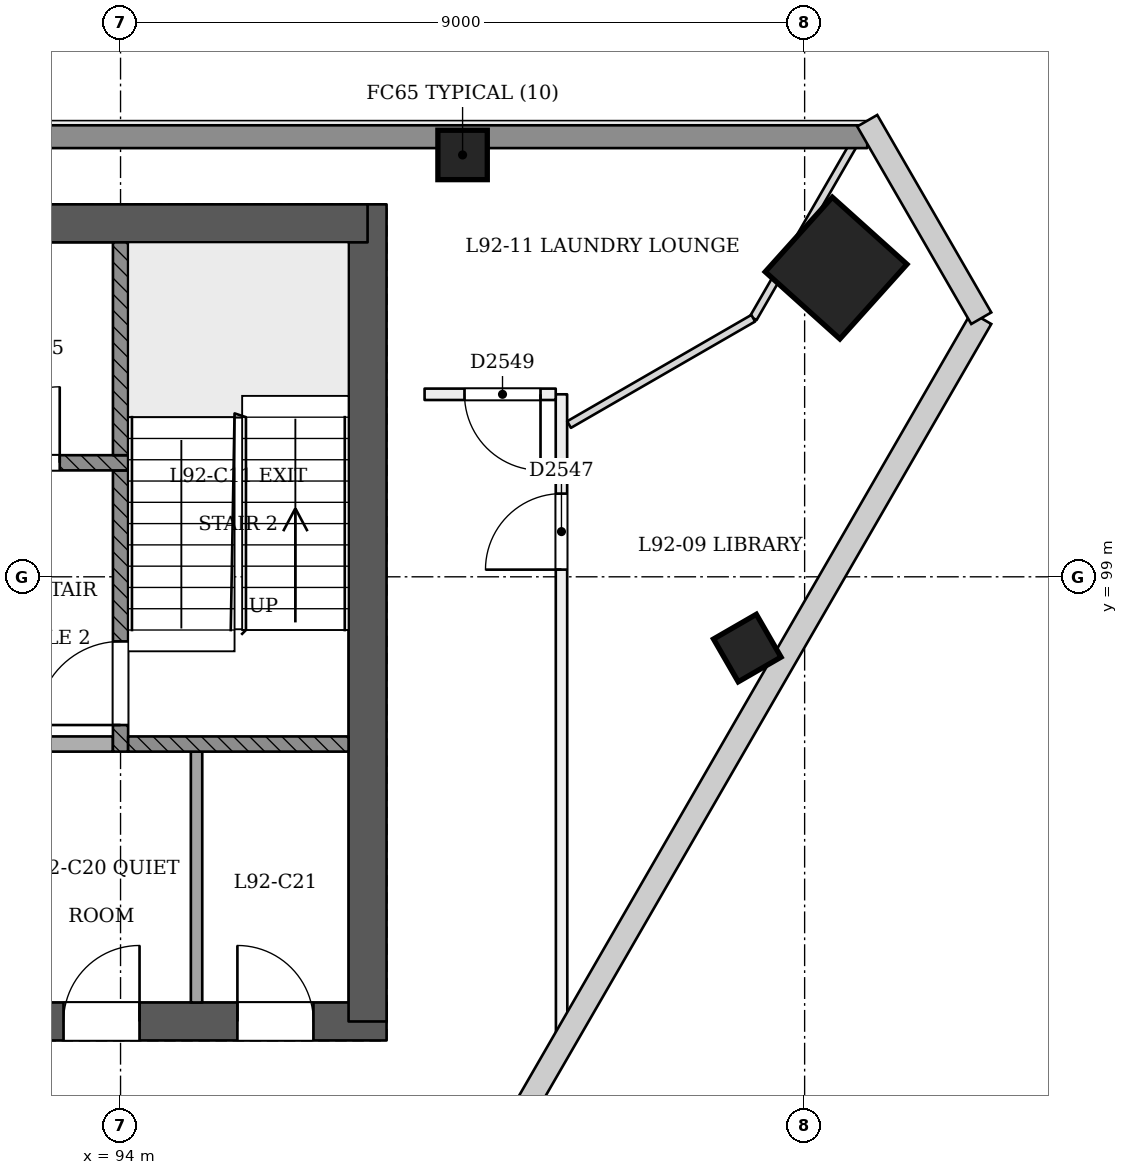
"""IFC4 building model, lengths in metres.
Left out: names, types, materials, properties, quantities, classifications, styles, units other than length and angle.
Written with IfcOpenShell. Run it as: python <this file> out.ifc"""

import sys

from ifc_helpers import new_model, si_unit, direction, frame, frame_2d, origin, origin_2d, place, context, subcontext, project, spatial, rectangle, extrude, element, fill, save


model = new_model("IFC4")
c1 = context("Model", 3, precision=1e-05, world=origin(), true_north=direction((0.0, 1.0)))
c2 = subcontext(c1, "Body", "Model", "MODEL_VIEW")
j1 = project(units=[si_unit("LENGTHUNIT", "METRE"), si_unit("PLANEANGLEUNIT", "RADIAN")], contexts=[c1])
p1 = place(None, origin())
s1 = spatial("IfcSite", under=j1, at=p1, CompositionType="ELEMENT")
p2 = place(p1, origin())
s2 = spatial("IfcBuilding", under=s1, at=p2, CompositionType="ELEMENT")
p3 = place(p2, frame((0.0, 0.0, 354.4)))
s3 = spatial("IfcBuildingStorey", under=s2, at=p3, CompositionType="ELEMENT", Elevation=354.4)
p4 = place(p3, frame((72.75, 93.15, 0.0), z_axis=(0.0, 0.0, 1.0), x_axis=(1.0, 0.0, 0.0)))
e1 = element("IfcWall", 1, at=p4, inside=s3, PredefinedType="SHEAR", context=c2, shape_type="SweptSolid", body=[
    extrude(rectangle(XDim=24.75, YDim=0.5, at=frame_2d((12.375, 0.0))), origin(), (0.0, 0.0, 1.0), 3.6),
])
p5 = place(p4, frame((1.05, 0.0, 0.0)))
e2 = element("IfcOpeningElement", 2, at=p5, cuts=e1, PredefinedType="OPENING", context=c2, shape_type="SweptSolid", body=[
    extrude(rectangle(XDim=1.2, YDim=2.1, at=frame_2d((0.6, 1.05))), frame((0.0, 0.26, 0.0), z_axis=(0.0, -1.0, 0.0), x_axis=(1.0, 0.0, 0.0)), (0.0, 0.0, 1.0), 0.521),
])
p6 = place(p4, frame((3.25, 0.0, 0.0)))
e3 = element("IfcOpeningElement", 3, at=p6, cuts=e1, PredefinedType="OPENING", context=c2, shape_type="SweptSolid", body=[
    extrude(rectangle(XDim=1.2, YDim=2.1, at=frame_2d((0.6, 1.05))), frame((0.0, 0.26, 0.0), z_axis=(0.0, -1.0, 0.0), x_axis=(1.0, 0.0, 0.0)), (0.0, 0.0, 1.0), 0.521),
])
p7 = place(p4, frame((13.25, 0.0, 0.0)))
e4 = element("IfcOpeningElement", 4, at=p7, cuts=e1, PredefinedType="OPENING", context=c2, shape_type="SweptSolid", body=[
    extrude(rectangle(XDim=1.2, YDim=2.1, at=frame_2d((0.6, 1.05))), frame((0.0, 0.26, 0.0), z_axis=(0.0, -1.0, 0.0), x_axis=(1.0, 0.0, 0.0)), (0.0, 0.0, 1.0), 0.521),
])
p8 = place(p4, frame((15.712, 0.0, 0.0)))
e5 = element("IfcOpeningElement", 5, at=p8, cuts=e1, PredefinedType="OPENING", context=c2, shape_type="SweptSolid", body=[
    extrude(rectangle(XDim=1.0, YDim=2.1, at=frame_2d((0.5, 1.05))), frame((0.0, 0.26, 0.0), z_axis=(0.0, -1.0, 0.0), x_axis=(1.0, 0.0, 0.0)), (0.0, 0.0, 1.0), 0.521),
])
p9 = place(p4, frame((18.15, 0.0, 0.0)))
e6 = element("IfcOpeningElement", 6, at=p9, cuts=e1, PredefinedType="OPENING", context=c2, shape_type="SweptSolid", body=[
    extrude(rectangle(XDim=1.0, YDim=2.1, at=frame_2d((0.5, 1.05))), frame((0.0, 0.26, 0.0), z_axis=(0.0, -1.0, 0.0), x_axis=(1.0, 0.0, 0.0)), (0.0, 0.0, 1.0), 0.521),
])
p10 = place(p4, frame((20.5, 0.0, 0.0)))
e7 = element("IfcOpeningElement", 7, at=p10, cuts=e1, PredefinedType="OPENING", context=c2, shape_type="SweptSolid", body=[
    extrude(rectangle(XDim=1.0, YDim=2.1, at=frame_2d((0.5, 1.05))), frame((0.0, 0.26, 0.0), z_axis=(0.0, -1.0, 0.0), x_axis=(1.0, 0.0, 0.0)), (0.0, 0.0, 1.0), 0.521),
])
p11 = place(p4, frame((22.788, 0.0, 0.0)))
e8 = element("IfcOpeningElement", 8, at=p11, cuts=e1, PredefinedType="OPENING", context=c2, shape_type="SweptSolid", body=[
    extrude(rectangle(XDim=1.0, YDim=2.1, at=frame_2d((0.5, 1.05))), frame((0.0, 0.26, 0.0), z_axis=(0.0, -1.0, 0.0), x_axis=(1.0, 0.0, 0.0)), (0.0, 0.0, 1.0), 0.521),
])
p12 = place(p3, frame((97.25, 93.15, 0.0), z_axis=(0.0, 0.0, 1.0), x_axis=(0.0, 1.0, 0.0)))
e9 = element("IfcWall", 9, at=p12, inside=s3, PredefinedType="SHEAR", context=c2, shape_type="SweptSolid", body=[
    extrude(rectangle(XDim=10.75, YDim=0.5, at=frame_2d((5.375, 0.0))), origin(), (0.0, 0.0, 1.0), 3.6),
])
p13 = place(p3, frame((97.25, 103.65, 0.0), z_axis=(0.0, 0.0, 1.0), x_axis=(-1.0, 0.0, 0.0)))
e10 = element("IfcWall", 10, at=p13, inside=s3, PredefinedType="SHEAR", context=c2, shape_type="SweptSolid", body=[
    extrude(rectangle(XDim=24.75, YDim=0.5, at=frame_2d((12.375, 0.0))), origin(), (0.0, 0.0, 1.0), 3.6),
])
p14 = place(p3, frame((103.448, 103.051, 0.0), z_axis=(-0.028401814599, 0.009218727412, 0.999554076572), x_axis=(0.500752502832, -0.865305542785, 0.022209199275)))
e11 = element("IfcColumn", 11, at=p14, inside=s3, PredefinedType="COLUMN", context=c2, shape_type="SweptSolid", body=[
    extrude(rectangle(XDim=1.32, YDim=1.32, at=origin_2d()), origin(), (0.0, 0.0, 1.0), 3.602),
])
p15 = place(p3, frame((98.5, 104.55, 0.0), z_axis=(0.0, 0.0, 1.0), x_axis=(1.0, 0.0, 0.0)))
e12 = element("IfcColumn", 12, at=p15, inside=s3, PredefinedType="COLUMN", context=c2, shape_type="SweptSolid", body=[
    extrude(rectangle(XDim=0.65, YDim=0.65, at=origin_2d()), origin(), (0.0, 0.0, 1.0), 3.6),
])
p16 = place(p3, frame((102.273, 98.016, -0.02), z_axis=(-0.022222910879, 0.038415824599, 0.999014697916), x_axis=(-0.499512959151, -0.866022170157, 0.022190187852)))
e13 = element("IfcColumn", 13, at=p16, inside=s3, PredefinedType="COLUMN", context=c2, shape_type="SweptSolid", body=[
    extrude(rectangle(XDim=0.65, YDim=0.65, at=origin_2d()), origin(), (0.0, 0.0, 1.0), 3.604),
])
p17 = place(p3, frame((99.803, 92.968, 0.0), z_axis=(0.0, 0.0, 1.0), x_axis=(-0.000318443663, 0.999999949297, 0.0)))
e14 = element("IfcWall", 14, at=p17, inside=s3, PredefinedType="PARTITIONING", context=c2, shape_type="SweptSolid", body=[
    extrude(rectangle(XDim=8.433, YDim=0.15, at=frame_2d((4.217, 0.0))), origin(), (0.0, 0.0, 1.0), 3.3),
])
p18 = place(p17, frame((6.127, 0.0, 0.0)))
e15 = element("IfcOpeningElement", 15, at=p18, cuts=e14, PredefinedType="OPENING", context=c2, shape_type="SweptSolid", body=[
    extrude(rectangle(XDim=1.0, YDim=2.1, at=frame_2d((0.5, 1.05))), frame((0.0, 0.085, 0.0), z_axis=(0.0, -1.0, 0.0), x_axis=(1.0, 0.0, 0.0)), (0.0, 0.0, 1.0), 0.171),
])
p19 = place(p3, frame((99.725, 101.401, 0.0), z_axis=(0.0, 0.0, 1.0), x_axis=(-1.0, 0.0, 0.0)))
e16 = element("IfcWall", 16, at=p19, inside=s3, PredefinedType="PARTITIONING", context=c2, shape_type="SweptSolid", body=[
    extrude(rectangle(XDim=1.725, YDim=0.15, at=frame_2d((0.863, 0.0))), origin(), (0.0, 0.0, 1.0), 3.3),
])
p20 = place(p19, frame((0.2, 0.0, 0.0)))
e17 = element("IfcOpeningElement", 17, at=p20, cuts=e16, PredefinedType="OPENING", context=c2, shape_type="SweptSolid", body=[
    extrude(rectangle(XDim=1.0, YDim=2.1, at=frame_2d((0.5, 1.05))), frame((0.0, 0.085, 0.0), z_axis=(0.0, -1.0, 0.0), x_axis=(1.0, 0.0, 0.0)), (0.0, 0.0, 1.0), 0.171),
])
p21 = place(p3, frame((103.766, 104.9, 0.0), z_axis=(0.0, 0.0, 1.0), x_axis=(-0.500035042182, -0.866005171226, 0.0)))
e18 = element("IfcWall", 18, at=p21, inside=s3, PredefinedType="PARTITIONING", context=c2, shape_type="SweptSolid", body=[
    extrude(rectangle(XDim=2.885, YDim=0.1, at=frame_2d((1.442, 0.0))), origin(), (0.0, 0.0, 1.0), 3.3),
])
p22 = place(p3, frame((102.324, 102.402, 0.0), z_axis=(0.0, 0.0, 1.0), x_axis=(-0.866017045845, -0.500014476097, 0.0)))
e19 = element("IfcWall", 19, at=p22, inside=s3, PredefinedType="PARTITIONING", context=c2, shape_type="SweptSolid", body=[
    extrude(rectangle(XDim=2.798, YDim=0.1, at=frame_2d((1.399, 0.0))), origin(), (0.0, 0.0, 1.0), 3.3),
])
p23 = place(p3, frame((66.176, 104.79, 0.0), z_axis=(0.0, 0.0, 1.0), x_axis=(1.0, 0.0, 0.0)))
e20 = element("IfcWall", 20, at=p23, inside=s3, PredefinedType="SOLIDWALL", context=c2, shape_type="SweptSolid", body=[
    extrude(rectangle(XDim=37.647, YDim=0.3, at=frame_2d((18.824, 0.0))), origin(), (0.0, 0.0, 1.0), 3.3),
])
p24 = place(p3, frame((95.0, 93.4, 0.0), z_axis=(0.0, 0.0, 1.0), x_axis=(0.0, 1.0, 0.0)))
e21 = element("IfcWall", 21, at=p24, inside=s3, PredefinedType="PARTITIONING", context=c2, shape_type="SweptSolid", body=[
    extrude(rectangle(XDim=3.3, YDim=0.15, at=frame_2d((1.65, 0.0))), origin(), (0.0, 0.0, 1.0), 3.3),
])
p25 = place(p3, frame((91.5, 96.8, 0.0), z_axis=(0.0, 0.0, 1.0), x_axis=(1.0, 0.0, 0.0)))
e22 = element("IfcWall", 22, at=p25, inside=s3, PredefinedType="PARTITIONING", context=c2, shape_type="SweptSolid", body=[
    extrude(rectangle(XDim=2.4, YDim=0.2, at=frame_2d((1.2, 0.0))), origin(), (0.0, 0.0, 1.0), 3.3),
])
p26 = place(p3, frame((94.0, 96.7, 0.0), z_axis=(0.0, 0.0, 1.0), x_axis=(0.0, 1.0, 0.0)))
e23 = element("IfcWall", 23, at=p26, inside=s3, PredefinedType="SOLIDWALL", context=c2, shape_type="SweptSolid", body=[
    extrude(rectangle(XDim=3.7, YDim=0.2, at=frame_2d((1.85, 0.0))), origin(), (0.0, 0.0, 1.0), 3.3),
])
p27 = place(p26, frame((0.35, 0.0, 0.0)))
e24 = element("IfcOpeningElement", 24, at=p27, cuts=e23, PredefinedType="OPENING", context=c2, shape_type="SweptSolid", body=[
    extrude(rectangle(XDim=1.1, YDim=2.1, at=frame_2d((0.55, 1.05))), frame((0.0, 0.11, 0.0), z_axis=(0.0, -1.0, 0.0), x_axis=(1.0, 0.0, 0.0)), (0.0, 0.0, 1.0), 0.221),
])
p28 = place(p3, frame((94.1, 96.8, 0.0), z_axis=(0.0, 0.0, 1.0), x_axis=(1.0, 0.0, 0.0)))
e25 = element("IfcWall", 25, at=p28, inside=s3, PredefinedType="SOLIDWALL", context=c2, shape_type="SweptSolid", body=[
    extrude(rectangle(XDim=2.9, YDim=0.2, at=frame_2d((1.45, 0.0))), origin(), (0.0, 0.0, 1.0), 3.3),
])
p29 = place(p3, frame((75.9, 100.5, 0.0), z_axis=(0.0, 0.0, 1.0), x_axis=(1.0, 0.0, 0.0)))
e26 = element("IfcWall", 26, at=p29, inside=s3, PredefinedType="SOLIDWALL", context=c2, shape_type="SweptSolid", body=[
    extrude(rectangle(XDim=18.2, YDim=0.2, at=frame_2d((9.1, 0.0))), origin(), (0.0, 0.0, 1.0), 3.3),
])
p30 = place(p29, frame((2.6, 0.0, 0.0)))
e27 = element("IfcOpeningElement", 27, at=p30, cuts=e26, PredefinedType="OPENING", context=c2, shape_type="SweptSolid", body=[
    extrude(rectangle(XDim=1.1, YDim=2.1, at=frame_2d((0.55, 1.05))), frame((0.0, 0.11, 0.0), z_axis=(0.0, -1.0, 0.0), x_axis=(1.0, 0.0, 0.0)), (0.0, 0.0, 1.0), 0.221),
])
p31 = place(p29, frame((4.5, 0.0, 0.0)))
e28 = element("IfcOpeningElement", 28, at=p31, cuts=e26, PredefinedType="OPENING", context=c2, shape_type="SweptSolid", body=[
    extrude(rectangle(XDim=1.1, YDim=2.1, at=frame_2d((0.55, 1.05))), frame((0.0, 0.11, 0.0), z_axis=(0.0, -1.0, 0.0), x_axis=(1.0, 0.0, 0.0)), (0.0, 0.0, 1.0), 0.221),
])
p32 = place(p29, frame((6.4, 0.0, 0.0)))
e29 = element("IfcOpeningElement", 29, at=p32, cuts=e26, PredefinedType="OPENING", context=c2, shape_type="SweptSolid", body=[
    extrude(rectangle(XDim=1.1, YDim=2.1, at=frame_2d((0.55, 1.05))), frame((0.0, 0.11, 0.0), z_axis=(0.0, -1.0, 0.0), x_axis=(1.0, 0.0, 0.0)), (0.0, 0.0, 1.0), 0.221),
])
p33 = place(p29, frame((8.3, 0.0, 0.0)))
e30 = element("IfcOpeningElement", 30, at=p33, cuts=e26, PredefinedType="OPENING", context=c2, shape_type="SweptSolid", body=[
    extrude(rectangle(XDim=1.1, YDim=2.1, at=frame_2d((0.55, 1.05))), frame((0.0, 0.11, 0.0), z_axis=(0.0, -1.0, 0.0), x_axis=(1.0, 0.0, 0.0)), (0.0, 0.0, 1.0), 0.221),
])
p34 = place(p29, frame((10.2, 0.0, 0.0)))
e31 = element("IfcOpeningElement", 31, at=p34, cuts=e26, PredefinedType="OPENING", context=c2, shape_type="SweptSolid", body=[
    extrude(rectangle(XDim=1.1, YDim=2.1, at=frame_2d((0.55, 1.05))), frame((0.0, 0.11, 0.0), z_axis=(0.0, -1.0, 0.0), x_axis=(1.0, 0.0, 0.0)), (0.0, 0.0, 1.0), 0.221),
])
p35 = place(p29, frame((12.1, 0.0, 0.0)))
e32 = element("IfcOpeningElement", 32, at=p35, cuts=e26, PredefinedType="OPENING", context=c2, shape_type="SweptSolid", body=[
    extrude(rectangle(XDim=1.1, YDim=2.1, at=frame_2d((0.55, 1.05))), frame((0.0, 0.11, 0.0), z_axis=(0.0, -1.0, 0.0), x_axis=(1.0, 0.0, 0.0)), (0.0, 0.0, 1.0), 0.221),
])
p36 = place(p29, frame((14.0, 0.0, 0.0)))
e33 = element("IfcOpeningElement", 33, at=p36, cuts=e26, PredefinedType="OPENING", context=c2, shape_type="SweptSolid", body=[
    extrude(rectangle(XDim=1.1, YDim=2.1, at=frame_2d((0.55, 1.05))), frame((0.0, 0.11, 0.0), z_axis=(0.0, -1.0, 0.0), x_axis=(1.0, 0.0, 0.0)), (0.0, 0.0, 1.0), 0.221),
])
p37 = place(p29, frame((0.65, 0.0, 0.0)))
e34 = element("IfcOpeningElement", 34, at=p37, cuts=e26, PredefinedType="OPENING", context=c2, shape_type="SweptSolid", body=[
    extrude(rectangle(XDim=1.0, YDim=2.1, at=frame_2d((0.5, 1.05))), frame((0.0, 0.11, 0.0), z_axis=(0.0, -1.0, 0.0), x_axis=(1.0, 0.0, 0.0)), (0.0, 0.0, 1.0), 0.221),
])
p38 = place(p29, frame((16.3, 0.0, 0.0)))
e35 = element("IfcOpeningElement", 35, at=p38, cuts=e26, PredefinedType="OPENING", context=c2, shape_type="SweptSolid", body=[
    extrude(rectangle(XDim=1.0, YDim=2.1, at=frame_2d((0.5, 1.05))), frame((0.0, 0.11, 0.0), z_axis=(0.0, -1.0, 0.0), x_axis=(1.0, 0.0, 0.0)), (0.0, 0.0, 1.0), 0.221),
])
p39 = place(p3, frame((94.0, 100.6, 0.0), z_axis=(0.0, 0.0, 1.0), x_axis=(0.0, 1.0, 0.0)))
e36 = element("IfcWall", 36, at=p39, inside=s3, PredefinedType="SOLIDWALL", context=c2, shape_type="SweptSolid", body=[
    extrude(rectangle(XDim=2.8, YDim=0.2, at=frame_2d((1.4, 0.0))), origin(), (0.0, 0.0, 1.0), 3.3),
])
p40 = place(p18, origin())
e37 = element("IfcDoor", 37, at=p40, inside=s3, OperationType="SINGLE_SWING_LEFT", PredefinedType="NOTDEFINED", context=c2, shape_type="SweptSolid", body=[
    extrude(rectangle(XDim=1.0, YDim=2.1, at=frame_2d((0.5, 1.05))), frame((0.0, 0.025, 0.0), z_axis=(0.0, -1.0, 0.0), x_axis=(1.0, 0.0, 0.0)), (0.0, 0.0, 1.0), 0.05),
])
fill(e15, e37)
p41 = place(p20, origin())
e38 = element("IfcDoor", 38, at=p41, inside=s3, OperationType="SINGLE_SWING_LEFT", PredefinedType="NOTDEFINED", context=c2, shape_type="SweptSolid", body=[
    extrude(rectangle(XDim=1.0, YDim=2.1, at=frame_2d((0.5, 1.05))), frame((0.0, 0.025, 0.0), z_axis=(0.0, -1.0, 0.0), x_axis=(1.0, 0.0, 0.0)), (0.0, 0.0, 1.0), 0.05),
])
fill(e17, e38)
p42 = place(p27, origin())
e39 = element("IfcDoor", 39, at=p42, inside=s3, OperationType="SINGLE_SWING_LEFT", PredefinedType="NOTDEFINED", context=c2, shape_type="SweptSolid", body=[
    extrude(rectangle(XDim=1.1, YDim=2.1, at=frame_2d((0.55, 1.05))), frame((0.0, 0.025, 0.0), z_axis=(0.0, -1.0, 0.0), x_axis=(1.0, 0.0, 0.0)), (0.0, 0.0, 1.0), 0.05),
])
fill(e24, e39)
p43 = place(p38, origin())
e40 = element("IfcDoor", 40, at=p43, inside=s3, OperationType="SINGLE_SWING_RIGHT", PredefinedType="NOTDEFINED", context=c2, shape_type="SweptSolid", body=[
    extrude(rectangle(XDim=1.0, YDim=2.1, at=frame_2d((0.5, 1.05))), frame((0.0, 0.025, 0.0), z_axis=(0.0, -1.0, 0.0), x_axis=(1.0, 0.0, 0.0)), (0.0, 0.0, 1.0), 0.05),
])
fill(e35, e40)
p44 = place(p10, origin())
e41 = element("IfcDoor", 41, at=p44, inside=s3, OperationType="SINGLE_SWING_RIGHT", PredefinedType="NOTDEFINED", context=c2, shape_type="SweptSolid", body=[
    extrude(rectangle(XDim=1.0, YDim=2.1, at=frame_2d((0.5, 1.05))), frame((0.0, 0.025, 0.0), z_axis=(0.0, -1.0, 0.0), x_axis=(1.0, 0.0, 0.0)), (0.0, 0.0, 1.0), 0.05),
])
fill(e7, e41)
p45 = place(p11, origin())
e42 = element("IfcDoor", 42, at=p45, inside=s3, OperationType="SINGLE_SWING_LEFT", PredefinedType="NOTDEFINED", context=c2, shape_type="SweptSolid", body=[
    extrude(rectangle(XDim=1.0, YDim=2.1, at=frame_2d((0.5, 1.05))), frame((0.0, 0.025, 0.0), z_axis=(0.0, -1.0, 0.0), x_axis=(1.0, 0.0, 0.0)), (0.0, 0.0, 1.0), 0.05),
])
fill(e8, e42)
save(model, sys.argv[1])
